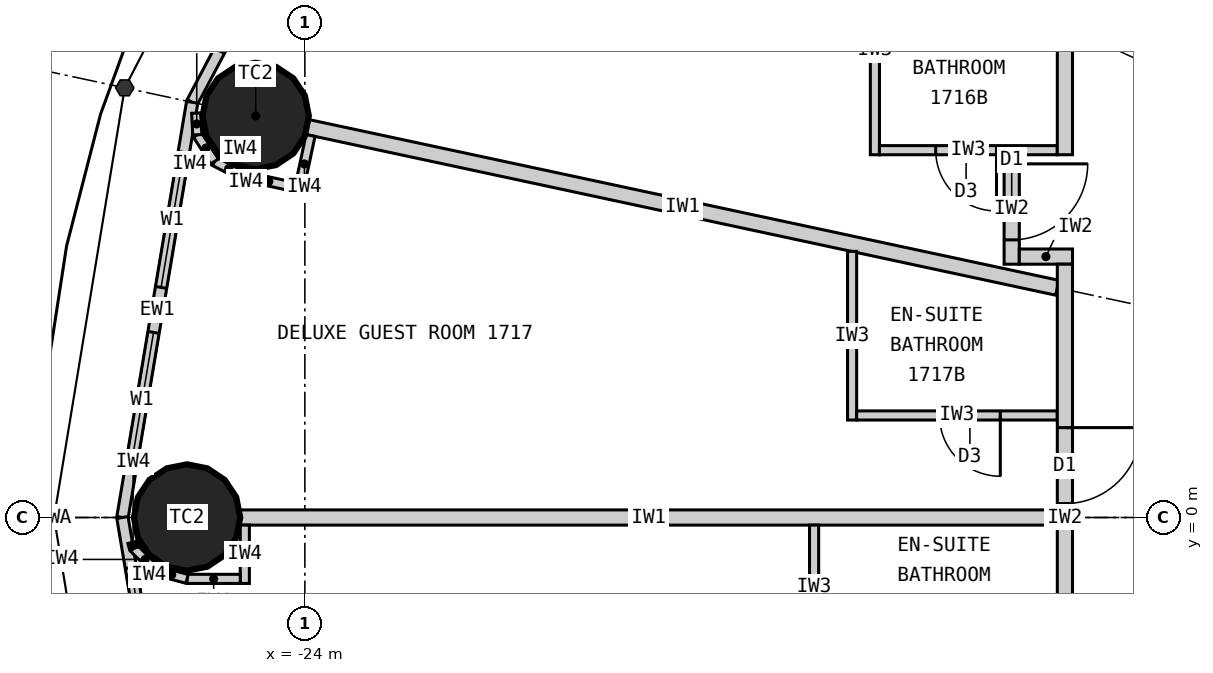
"""IFC4 building model, lengths in metres.
Left out: names, types, materials, properties, quantities, classifications, styles, units other than length and angle.
Written with IfcOpenShell. Run it as: python <this file> out.ifc"""

import sys

from ifc_helpers import new_model, si_unit, direction, frame, frame_2d, origin, origin_2d, place, context, subcontext, project, spatial, rectangle, circle, extrude, element, fill, save


model = new_model("IFC4")
c1 = context("Model", 3, precision=1e-05, world=origin(), true_north=direction((0.0, 1.0)))
c2 = subcontext(c1, "Body", "Model", "MODEL_VIEW")
j1 = project(units=[si_unit("LENGTHUNIT", "METRE"), si_unit("PLANEANGLEUNIT", "RADIAN")], contexts=[c1])
p1 = place(None, origin())
s1 = spatial("IfcSite", under=j1, at=p1, CompositionType="ELEMENT")
p2 = place(p1, origin())
s2 = spatial("IfcBuilding", under=s1, at=p2, CompositionType="ELEMENT")
p3 = place(p2, frame((0.0, 0.0, 70.5)))
s3 = spatial("IfcBuildingStorey", under=s2, at=p3, CompositionType="ELEMENT", Elevation=70.5)
for number, where, z_axis, x_axis in (
    (1, (-24.647, 5.283, 0.0), (0.0, 0.0, 1.0), (1.0, 0.0, 0.0)),
    (2, (-25.55, 0.0, 0.0), (0.0, 0.0, 1.0), (1.0, 0.0, 0.0)),
):
    element("IfcColumn", number, at=place(p3, frame(where, z_axis=z_axis, x_axis=x_axis)), inside=s3, PredefinedType="COLUMN", context=c2, shape_type="SweptSolid", body=[
        extrude(circle(Radius=0.7, at=origin_2d()), origin(), (0.0, 0.0, 1.0), 3.3),
    ])
p4 = place(p3, frame((-22.803, 10.532, 0.0), z_axis=(0.0, 0.0, 1.0), x_axis=(-0.467296867008, -0.884100468321, 0.0)))
e3 = element("IfcWall", 3, at=p4, inside=s3, PredefinedType="ELEMENTEDWALL", context=c2, shape_type="SweptSolid", body=[
    extrude(rectangle(XDim=5.734, YDim=0.15, at=frame_2d((2.867, 0.0))), origin(), (0.0, 0.0, 1.0), 3.12),
])
p5 = place(p4, frame((0.767, 0.0, 0.9)))
e4 = element("IfcOpeningElement", 4, at=p5, cuts=e3, PredefinedType="OPENING", context=c2, shape_type="SweptSolid", body=[
    extrude(rectangle(XDim=1.8, YDim=1.9, at=frame_2d((0.9, 0.95))), frame((0.0, 0.085, 0.0), z_axis=(0.0, -1.0, 0.0), x_axis=(1.0, 0.0, 0.0)), (0.0, 0.0, 1.0), 0.17),
])
p6 = place(p4, frame((3.167, 0.0, 0.9)))
e5 = element("IfcOpeningElement", 5, at=p6, cuts=e3, PredefinedType="OPENING", context=c2, shape_type="SweptSolid", body=[
    extrude(rectangle(XDim=1.8, YDim=1.9, at=frame_2d((0.9, 0.95))), frame((0.0, 0.085, 0.0), z_axis=(0.0, -1.0, 0.0), x_axis=(1.0, 0.0, 0.0)), (0.0, 0.0, 1.0), 0.17),
])
p7 = place(p3, frame((-25.482, 5.462, 0.0), z_axis=(0.0, 0.0, 1.0), x_axis=(-0.165642551694, -0.986185857264, 0.0)))
e6 = element("IfcWall", 6, at=p7, inside=s3, PredefinedType="ELEMENTEDWALL", context=c2, shape_type="SweptSolid", body=[
    extrude(rectangle(XDim=5.539, YDim=0.15, at=frame_2d((2.77, 0.0))), origin(), (0.0, 0.0, 1.0), 3.12),
])
p8 = place(p7, frame((0.669, 0.0, 0.9)))
e7 = element("IfcOpeningElement", 7, at=p8, cuts=e6, PredefinedType="OPENING", context=c2, shape_type="SweptSolid", body=[
    extrude(rectangle(XDim=1.8, YDim=1.9, at=frame_2d((0.9, 0.95))), frame((0.0, 0.085, 0.0), z_axis=(0.0, -1.0, 0.0), x_axis=(1.0, 0.0, 0.0)), (0.0, 0.0, 1.0), 0.17),
])
p9 = place(p7, frame((3.07, 0.0, 0.9)))
e8 = element("IfcOpeningElement", 8, at=p9, cuts=e6, PredefinedType="OPENING", context=c2, shape_type="SweptSolid", body=[
    extrude(rectangle(XDim=1.8, YDim=1.9, at=frame_2d((0.9, 0.95))), frame((0.0, 0.085, 0.0), z_axis=(0.0, -1.0, 0.0), x_axis=(1.0, 0.0, 0.0)), (0.0, 0.0, 1.0), 0.17),
])
p10 = place(p3, frame((-26.4, 0.0, 0.0), z_axis=(0.0, 0.0, 1.0), x_axis=(0.165642551694, -0.986185857264, 0.0)))
e9 = element("IfcWall", 9, at=p10, inside=s3, PredefinedType="ELEMENTEDWALL", context=c2, shape_type="SweptSolid", body=[
    extrude(rectangle(XDim=5.539, YDim=0.15, at=frame_2d((2.77, 0.0))), origin(), (0.0, 0.0, 1.0), 3.12),
])
p11 = place(p10, frame((0.669, 0.0, 0.9)))
e10 = element("IfcOpeningElement", 10, at=p11, cuts=e9, PredefinedType="OPENING", context=c2, shape_type="SweptSolid", body=[
    extrude(rectangle(XDim=1.8, YDim=1.9, at=frame_2d((0.9, 0.95))), frame((0.0, 0.085, 0.0), z_axis=(0.0, -1.0, 0.0), x_axis=(1.0, 0.0, 0.0)), (0.0, 0.0, 1.0), 0.17),
])
p12 = place(p10, frame((3.07, 0.0, 0.9)))
e11 = element("IfcOpeningElement", 11, at=p12, cuts=e9, PredefinedType="OPENING", context=c2, shape_type="SweptSolid", body=[
    extrude(rectangle(XDim=1.8, YDim=1.9, at=frame_2d((0.9, 0.95))), frame((0.0, 0.085, 0.0), z_axis=(0.0, -1.0, 0.0), x_axis=(1.0, 0.0, 0.0)), (0.0, 0.0, 1.0), 0.17),
])
p13 = place(p3, frame((-14.1, 3.022, 0.0), z_axis=(0.0, 0.0, 1.0), x_axis=(-0.977790014929, 0.209586943072, 0.0)))
e12 = element("IfcWall", 12, at=p13, inside=s3, PredefinedType="PARTITIONING", context=c2, shape_type="SweptSolid", body=[
    extrude(rectangle(XDim=10.087, YDim=0.2, at=frame_2d((5.043, 0.0))), origin(), (0.0, 0.0, 1.0), 2.32),
])
p14 = place(p3, frame((-14.1, 0.0, 0.0), z_axis=(0.0, 0.0, 1.0), x_axis=(-1.0, 0.0, 0.0)))
e13 = element("IfcWall", 13, at=p14, inside=s3, PredefinedType="PARTITIONING", context=c2, shape_type="SweptSolid", body=[
    extrude(rectangle(XDim=10.75, YDim=0.2, at=frame_2d((5.375, 0.0))), origin(), (0.0, 0.0, 1.0), 2.27),
])
p15 = place(p3, frame((-16.5, 7.521, 0.0), z_axis=(0.0, 0.0, 1.0), x_axis=(0.0, -1.0, 0.0)))
e14 = element("IfcWall", 14, at=p15, inside=s3, PredefinedType="PARTITIONING", context=c2, shape_type="SweptSolid", body=[
    extrude(rectangle(XDim=2.749, YDim=0.12, at=frame_2d((1.374, 0.0))), origin(), (0.0, 0.0, 1.0), 3.12),
])
p16 = place(p3, frame((-14.1, 4.833, 0.0), z_axis=(0.0, 0.0, 1.0), x_axis=(-1.0, 0.0, 0.0)))
e15 = element("IfcWall", 15, at=p16, inside=s3, PredefinedType="PARTITIONING", context=c2, shape_type="SweptSolid", body=[
    extrude(rectangle(XDim=2.34, YDim=0.12, at=frame_2d((1.17, 0.0))), origin(), (0.0, 0.0, 1.0), 3.12),
])
p17 = place(p16, frame((0.8, 0.0, 0.0)))
e16 = element("IfcOpeningElement", 16, at=p17, cuts=e15, PredefinedType="OPENING", context=c2, shape_type="SweptSolid", body=[
    extrude(rectangle(XDim=0.8, YDim=2.1, at=frame_2d((0.4, 1.05))), frame((0.0, 0.07, 0.0), z_axis=(0.0, -1.0, 0.0), x_axis=(1.0, 0.0, 0.0)), (0.0, 0.0, 1.0), 0.14),
])
p18 = place(p3, frame((-16.8, 3.501, 0.0), z_axis=(0.0, 0.0, 1.0), x_axis=(0.0, -1.0, 0.0)))
e17 = element("IfcWall", 17, at=p18, inside=s3, PredefinedType="PARTITIONING", context=c2, shape_type="SweptSolid", body=[
    extrude(rectangle(XDim=2.219, YDim=0.12, at=frame_2d((1.109, 0.0))), origin(), (0.0, 0.0, 1.0), 3.12),
])
p19 = place(p3, frame((-14.1, 1.343, 0.0), z_axis=(0.0, 0.0, 1.0), x_axis=(-1.0, 0.0, 0.0)))
e18 = element("IfcWall", 18, at=p19, inside=s3, PredefinedType="PARTITIONING", context=c2, shape_type="SweptSolid", body=[
    extrude(rectangle(XDim=2.64, YDim=0.12, at=frame_2d((1.32, 0.0))), origin(), (0.0, 0.0, 1.0), 3.12),
])
p20 = place(p19, frame((0.75, 0.0, 0.0)))
e19 = element("IfcOpeningElement", 19, at=p20, cuts=e18, PredefinedType="OPENING", context=c2, shape_type="SweptSolid", body=[
    extrude(rectangle(XDim=0.8, YDim=2.1, at=frame_2d((0.4, 1.05))), frame((0.0, 0.07, 0.0), z_axis=(0.0, -1.0, 0.0), x_axis=(1.0, 0.0, 0.0)), (0.0, 0.0, 1.0), 0.14),
])
p21 = place(p3, frame((-17.3, -0.1, 0.0), z_axis=(0.0, 0.0, 1.0), x_axis=(0.0, -1.0, 0.0)))
e20 = element("IfcWall", 20, at=p21, inside=s3, PredefinedType="PARTITIONING", context=c2, shape_type="SweptSolid", body=[
    extrude(rectangle(XDim=1.64, YDim=0.12, at=frame_2d((0.82, 0.0))), origin(), (0.0, 0.0, 1.0), 3.12),
])
p22 = place(p3, frame((-14.7, 4.772, 0.0), z_axis=(0.0, 0.0, 1.0), x_axis=(0.0, -1.0, 0.0)))
e21 = element("IfcWall", 21, at=p22, inside=s3, PredefinedType="PARTITIONING", context=c2, shape_type="SweptSolid", body=[
    extrude(rectangle(XDim=1.44, YDim=0.2, at=frame_2d((0.72, 0.0))), origin(), (0.0, 0.0, 1.0), 3.12),
])
p23 = place(p22, frame((0.12, 0.0, 0.0)))
e22 = element("IfcOpeningElement", 22, at=p23, cuts=e21, PredefinedType="OPENING", context=c2, shape_type="SweptSolid", body=[
    extrude(rectangle(XDim=1.0, YDim=2.2, at=frame_2d((0.5, 1.1))), frame((0.0, 0.11, 0.0), z_axis=(0.0, -1.0, 0.0), x_axis=(1.0, 0.0, 0.0)), (0.0, 0.0, 1.0), 0.22),
])
p24 = place(p3, frame((-13.9, 3.433, 0.0), z_axis=(0.0, 0.0, 1.0), x_axis=(-1.0, 0.0, 0.0)))
e23 = element("IfcWall", 23, at=p24, inside=s3, PredefinedType="PARTITIONING", context=c2, shape_type="SweptSolid", body=[
    extrude(rectangle(XDim=0.7, YDim=0.2, at=frame_2d((0.35, 0.0))), origin(), (0.0, 0.0, 1.0), 2.32),
])
p25 = place(p3, frame((-14.0, 9.9, 0.0), z_axis=(0.0, 0.0, 1.0), x_axis=(0.0, -1.0, 0.0)))
e24 = element("IfcWall", 24, at=p25, inside=s3, PredefinedType="PARTITIONING", context=c2, shape_type="SweptSolid", body=[
    extrude(rectangle(XDim=5.127, YDim=0.2, at=frame_2d((2.564, 0.0))), origin(), (0.0, 0.0, 1.0), 3.12),
])
p26 = place(p25, frame((0.103, 0.0, 0.0)))
e25 = element("IfcOpeningElement", 25, at=p26, cuts=e24, PredefinedType="OPENING", context=c2, shape_type="SweptSolid", body=[
    extrude(rectangle(XDim=1.0, YDim=2.2, at=frame_2d((0.5, 1.1))), frame((0.0, 0.11, 0.0), z_axis=(0.0, -1.0, 0.0), x_axis=(1.0, 0.0, 0.0)), (0.0, 0.0, 1.0), 0.22),
])
p27 = place(p3, frame((-14.0, 3.333, 0.0), z_axis=(0.0, 0.0, 1.0), x_axis=(0.0, -1.0, 0.0)))
e26 = element("IfcWall", 26, at=p27, inside=s3, PredefinedType="PARTITIONING", context=c2, shape_type="SweptSolid", body=[
    extrude(rectangle(XDim=6.665, YDim=0.2, at=frame_2d((3.333, 0.0))), origin(), (0.0, 0.0, 1.0), 3.12),
])
p28 = place(p27, frame((2.15, 0.0, 0.0)))
e27 = element("IfcOpeningElement", 27, at=p28, cuts=e26, PredefinedType="OPENING", context=c2, shape_type="SweptSolid", body=[
    extrude(rectangle(XDim=1.0, YDim=2.2, at=frame_2d((0.5, 1.1))), frame((0.0, 0.11, 0.0), z_axis=(0.0, -1.0, 0.0), x_axis=(1.0, 0.0, 0.0)), (0.0, 0.0, 1.0), 0.22),
])
p29 = place(p27, frame((5.173, 0.0, 0.0)))
e28 = element("IfcOpeningElement", 28, at=p29, cuts=e26, PredefinedType="OPENING", context=c2, shape_type="SweptSolid", body=[
    extrude(rectangle(XDim=1.0, YDim=2.2, at=frame_2d((0.5, 1.1))), frame((0.0, 0.11, 0.0), z_axis=(0.0, -1.0, 0.0), x_axis=(1.0, 0.0, 0.0)), (0.0, 0.0, 1.0), 0.22),
])
p30 = place(p3, frame((-23.925, 5.026, 0.0), z_axis=(0.0, 0.0, 1.0), x_axis=(-0.209681192172, -0.977769808109, 0.0)))
e29 = element("IfcWall", 29, at=p30, inside=s3, PredefinedType="PARTITIONING", context=c2, shape_type="SweptSolid", body=[
    extrude(rectangle(XDim=0.767, YDim=0.12, at=frame_2d((0.384, 0.0))), origin(), (0.0, 0.0, 1.0), 3.12),
])
p31 = place(p3, frame((-24.132, 4.347, 0.0), z_axis=(0.0, 0.0, 1.0), x_axis=(-0.977776882509, 0.209648200638, 0.0)))
e30 = element("IfcWall", 30, at=p31, inside=s3, PredefinedType="PARTITIONING", context=c2, shape_type="SweptSolid", body=[
    extrude(rectangle(XDim=0.7, YDim=0.12, at=frame_2d((0.35, 0.0))), origin(), (0.0, 0.0, 1.0), 3.12),
])
for number, where, z_axis, x_axis in (
    (31, (-24.816, 4.494, 0.0), (0.0, 0.0, 1.0), (-0.89, 0.455, 0.0)),
    (32, (-25.188, 4.684, 0.0), (0.0, 0.0, 1.0), (-0.543, 0.84, 0.0)),
):
    element("IfcWall", number, at=place(p3, frame(where, z_axis=z_axis, x_axis=x_axis)), inside=s3, PredefinedType="PARTITIONING", context=c2, shape_type="SweptSolid", body=[
        extrude(rectangle(XDim=0.418, YDim=0.12, at=frame_2d((0.209, 0.0))), origin(), (0.0, 0.0, 1.0), 3.12),
    ])
p32 = place(p3, frame((-25.416, 5.035, 0.0), z_axis=(0.0, 0.0, 1.0), x_axis=(-0.050406329159, 0.998728793007, 0.0)))
e33 = element("IfcWall", 33, at=p32, inside=s3, PredefinedType="PARTITIONING", context=c2, shape_type="SweptSolid", body=[
    extrude(rectangle(XDim=0.286, YDim=0.12, at=frame_2d((0.143, 0.0))), origin(), (0.0, 0.0, 1.0), 3.12),
])
p33 = place(p3, frame((-24.79, -0.1, 0.0), z_axis=(0.0, 0.0, 1.0), x_axis=(0.0, -1.0, 0.0)))
e34 = element("IfcWall", 34, at=p33, inside=s3, PredefinedType="PARTITIONING", context=c2, shape_type="SweptSolid", body=[
    extrude(rectangle(XDim=0.767, YDim=0.12, at=frame_2d((0.384, 0.0))), origin(), (0.0, 0.0, 1.0), 3.12),
])
p34 = place(p3, frame((-24.85, -0.808, 0.0), z_axis=(0.0, 0.0, 1.0), x_axis=(-1.0, 0.0, 0.0)))
e35 = element("IfcWall", 35, at=p34, inside=s3, PredefinedType="PARTITIONING", context=c2, shape_type="SweptSolid", body=[
    extrude(rectangle(XDim=0.7, YDim=0.12, at=frame_2d((0.35, 0.0))), origin(), (0.0, 0.0, 1.0), 3.12),
])
p35 = place(p3, frame((-25.55, -0.808, 0.0), z_axis=(0.0, 0.0, 1.0), x_axis=(-0.965807183573, 0.2592614205, 0.0)))
e36 = element("IfcWall", 36, at=p35, inside=s3, PredefinedType="PARTITIONING", context=c2, shape_type="SweptSolid", body=[
    extrude(rectangle(XDim=0.418, YDim=0.12, at=frame_2d((0.209, 0.0))), origin(), (0.0, 0.0, 1.0), 3.12),
])
p36 = place(p3, frame((-25.954, -0.699, 0.0), z_axis=(0.0, 0.0, 1.0), x_axis=(-0.707106781187, 0.707106781187, 0.0)))
e37 = element("IfcWall", 37, at=p36, inside=s3, PredefinedType="PARTITIONING", context=c2, shape_type="SweptSolid", body=[
    extrude(rectangle(XDim=0.418, YDim=0.12, at=frame_2d((0.209, 0.0))), origin(), (0.0, 0.0, 1.0), 3.12),
])
p37 = place(p3, frame((-26.249, -0.404, 0.0), z_axis=(0.0, 0.0, 1.0), x_axis=(-0.259754282609, 0.965674744759, 0.0)))
e38 = element("IfcWall", 38, at=p37, inside=s3, PredefinedType="PARTITIONING", context=c2, shape_type="SweptSolid", body=[
    extrude(rectangle(XDim=0.08, YDim=0.12, at=frame_2d((0.04, 0.0))), origin(), (0.0, 0.0, 1.0), 3.12),
])
p38 = place(p8, origin())
e39 = element("IfcWindow", 39, at=p38, inside=s3, PartitioningType="SINGLE_PANEL", PredefinedType="WINDOW", context=c2, shape_type="SweptSolid", body=[
    extrude(rectangle(XDim=1.8, YDim=1.9, at=frame_2d((0.9, 0.95))), frame((0.0, 0.03, 0.0), z_axis=(0.0, -1.0, 0.0), x_axis=(1.0, 0.0, 0.0)), (0.0, 0.0, 1.0), 0.06),
])
fill(e7, e39)
p39 = place(p9, origin())
e40 = element("IfcWindow", 40, at=p39, inside=s3, PartitioningType="SINGLE_PANEL", PredefinedType="WINDOW", context=c2, shape_type="SweptSolid", body=[
    extrude(rectangle(XDim=1.8, YDim=1.9, at=frame_2d((0.9, 0.95))), frame((0.0, 0.03, 0.0), z_axis=(0.0, -1.0, 0.0), x_axis=(1.0, 0.0, 0.0)), (0.0, 0.0, 1.0), 0.06),
])
fill(e8, e40)
p40 = place(p11, origin())
e41 = element("IfcWindow", 41, at=p40, inside=s3, PartitioningType="SINGLE_PANEL", PredefinedType="WINDOW", context=c2, shape_type="SweptSolid", body=[
    extrude(rectangle(XDim=1.8, YDim=1.9, at=frame_2d((0.9, 0.95))), frame((0.0, 0.03, 0.0), z_axis=(0.0, -1.0, 0.0), x_axis=(1.0, 0.0, 0.0)), (0.0, 0.0, 1.0), 0.06),
])
fill(e10, e41)
p41 = place(p17, origin())
e42 = element("IfcDoor", 42, at=p41, inside=s3, OperationType="SINGLE_SWING_LEFT", PredefinedType="DOOR", context=c2, shape_type="SweptSolid", body=[
    extrude(rectangle(XDim=0.8, YDim=2.1, at=frame_2d((0.4, 1.05))), frame((0.0, 0.025, 0.0), z_axis=(0.0, -1.0, 0.0), x_axis=(1.0, 0.0, 0.0)), (0.0, 0.0, 1.0), 0.05),
])
fill(e16, e42)
p42 = place(p23, origin())
e43 = element("IfcDoor", 43, at=p42, inside=s3, OperationType="SINGLE_SWING_LEFT", PredefinedType="DOOR", context=c2, shape_type="SweptSolid", body=[
    extrude(rectangle(XDim=1.0, YDim=2.2, at=frame_2d((0.5, 1.1))), frame((0.0, 0.025, 0.0), z_axis=(0.0, -1.0, 0.0), x_axis=(1.0, 0.0, 0.0)), (0.0, 0.0, 1.0), 0.05),
])
fill(e22, e43)
p43 = place(p20, origin())
e44 = element("IfcDoor", 44, at=p43, inside=s3, OperationType="SINGLE_SWING_LEFT", PredefinedType="DOOR", context=c2, shape_type="SweptSolid", body=[
    extrude(rectangle(XDim=0.8, YDim=2.1, at=frame_2d((0.4, 1.05))), frame((0.0, 0.025, 0.0), z_axis=(0.0, -1.0, 0.0), x_axis=(1.0, 0.0, 0.0)), (0.0, 0.0, 1.0), 0.05),
])
fill(e19, e44)
p44 = place(p28, origin())
e45 = element("IfcDoor", 45, at=p44, inside=s3, OperationType="SINGLE_SWING_LEFT", PredefinedType="DOOR", context=c2, shape_type="SweptSolid", body=[
    extrude(rectangle(XDim=1.0, YDim=2.2, at=frame_2d((0.5, 1.1))), frame((0.0, 0.025, 0.0), z_axis=(0.0, -1.0, 0.0), x_axis=(1.0, 0.0, 0.0)), (0.0, 0.0, 1.0), 0.05),
])
fill(e27, e45)
save(model, sys.argv[1])
